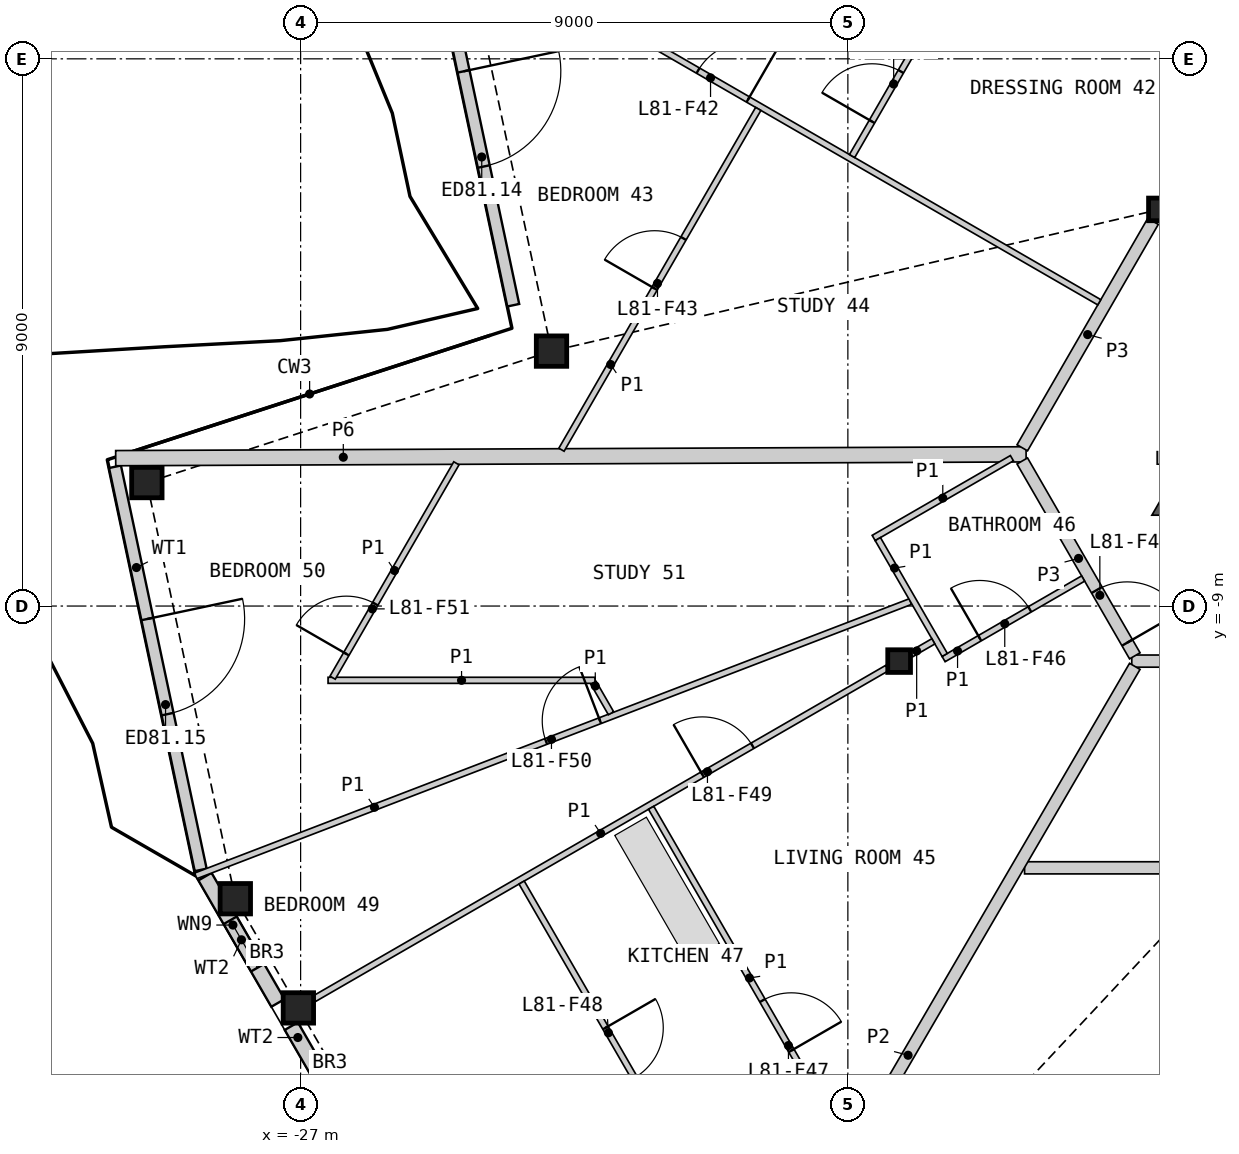
"""IFC4 building model, lengths in metres.
Left out: names, types, materials, properties, quantities, classifications, styles, units other than length and angle.
Written with IfcOpenShell. Run it as: python <this file> out.ifc"""

import sys

from ifc_helpers import new_model, si_unit, direction, frame, frame_2d, origin, origin_2d, place, context, subcontext, project, spatial, polyline, rectangle, hollow_rectangle, i_section, outline, extrude, element, fill, save


model = new_model("IFC4")
c1 = context("Model", 3, precision=1e-05, world=origin(), true_north=direction((0.0, 1.0)))
c2 = subcontext(c1, "Body", "Model", "MODEL_VIEW")
j1 = project(units=[si_unit("LENGTHUNIT", "METRE"), si_unit("PLANEANGLEUNIT", "RADIAN")], contexts=[c1])
p1 = place(None, origin())
s1 = spatial("IfcSite", under=j1, at=p1, CompositionType="ELEMENT")
p2 = place(p1, origin())
s2 = spatial("IfcBuilding", under=s1, at=p2, CompositionType="ELEMENT")
p3 = place(p2, frame((0.0, 0.0, 364.4)))
s3 = spatial("IfcBuildingStorey", under=s2, at=p3, CompositionType="ELEMENT", Elevation=364.4)
for number, where, z_axis, x_axis in (
    (1, (-22.874, -4.807, 0.0), (0.0, 0.0, 1.0), (1.0, 0.0, 0.0)),
    (2, (-29.529, -6.969, 0.0), (0.0, 0.0, 1.0), (1.0, 0.0, 0.0)),
    (3, (-28.074, -13.814, 0.0), (0.0, 0.0, 1.0), (1.0, 0.0, 0.0)),
    (4, (-27.037, -15.61, 0.0), (0.0, 0.0, 1.0), (1.0, 0.0, 0.0)),
):
    element("IfcColumn", number, at=place(p3, frame(where, z_axis=z_axis, x_axis=x_axis)), inside=s3, PredefinedType="COLUMN", context=c2, shape_type="SweptSolid", body=[
        extrude(hollow_rectangle(XDim=0.5, YDim=0.5, WallThickness=0.03, at=origin_2d()), origin(), (0.0, 0.0, 1.0), 3.4),
    ])
for number, where, z_axis, x_axis in (
    (5, (-12.868, -2.476, 0.0), (0.0, 0.0, 1.0), (1.0, 0.0, 0.0)),
    (6, (-17.157, -9.906, 0.0), (0.0, 0.0, 1.0), (1.0, 0.0, 0.0)),
):
    element("IfcColumn", number, at=place(p3, frame(where, z_axis=z_axis, x_axis=x_axis)), inside=s3, PredefinedType="COLUMN", context=c2, shape_type="SweptSolid", body=[
        extrude(i_section(OverallWidth=0.374, OverallDepth=0.372, WebThickness=0.016, FlangeThickness=0.026, at=origin_2d()), origin(), (0.0, 0.0, 1.0), 3.4),
    ])
p4 = place(p3, frame((-24.834, 2.209, 0.0), z_axis=(0.0, 0.0, 1.0), x_axis=(0.20791668045, -0.978146540142, 0.0)))
e7 = element("IfcWall", 7, at=p4, inside=s3, PredefinedType="SOLIDWALL", context=c2, shape_type="SweptSolid", body=[
    extrude(rectangle(XDim=6.402, YDim=0.2, at=frame_2d((3.201, 0.0))), origin(), (0.0, 0.0, 1.0), 2.634),
])
p5 = place(p4, frame((2.469, 0.0, 0.0)))
e8 = element("IfcOpeningElement", 8, at=p5, cuts=e7, PredefinedType="OPENING", context=c2, shape_type="SweptSolid", body=[
    extrude(rectangle(XDim=1.6, YDim=2.25, at=frame_2d((0.8, 1.125))), frame((0.0, 0.11, 0.0), z_axis=(0.0, -1.0, 0.0), x_axis=(1.0, 0.0, 0.0)), (0.0, 0.0, 1.0), 0.22),
])
p6 = place(p3, frame((-30.053, -6.709, 0.0), z_axis=(0.0, 0.0, 1.0), x_axis=(0.207917767315, -0.978146309115, 0.0)))
e9 = element("IfcWall", 9, at=p6, inside=s3, PredefinedType="SOLIDWALL", context=c2, shape_type="SweptSolid", body=[
    extrude(rectangle(XDim=6.779, YDim=0.2, at=frame_2d((3.389, 0.0))), origin(), (0.0, 0.0, 1.0), 2.634),
])
p7 = place(p6, frame((2.559, 0.0, 0.0)))
e10 = element("IfcOpeningElement", 10, at=p7, cuts=e9, PredefinedType="OPENING", context=c2, shape_type="SweptSolid", body=[
    extrude(rectangle(XDim=1.6, YDim=2.25, at=frame_2d((0.8, 1.125))), frame((0.0, 0.11, 0.0), z_axis=(0.0, -1.0, 0.0), x_axis=(1.0, 0.0, 0.0)), (0.0, 0.0, 1.0), 0.22),
])
p8 = place(p3, frame((-28.573, -13.45, 0.0), z_axis=(0.0, 0.0, 1.0), x_axis=(0.499969057507, -0.866043267704, 0.0)))
e11 = element("IfcWall", 11, at=p8, inside=s3, PredefinedType="SOLIDWALL", context=c2, shape_type="SweptSolid", body=[
    extrude(rectangle(XDim=2.4, YDim=0.25, at=frame_2d((1.2, 0.0))), origin(), (0.0, 0.0, 1.0), 2.634),
])
p9 = place(p8, frame((0.83, 0.0, 0.6)))
e12 = element("IfcOpeningElement", 12, at=p9, cuts=e11, PredefinedType="OPENING", context=c2, shape_type="SweptSolid", body=[
    extrude(rectangle(XDim=0.9, YDim=1.8, at=frame_2d((0.45, 0.9))), frame((0.0, 0.135, 0.0), z_axis=(0.0, -1.0, 0.0), x_axis=(1.0, 0.0, 0.0)), (0.0, 0.0, 1.0), 0.27),
])
p10 = place(p3, frame((-27.153, -15.91, 0.0), z_axis=(0.0, 0.0, 1.0), x_axis=(0.50000982419, -0.866019731711, 0.0)))
e13 = element("IfcWall", 13, at=p10, inside=s3, PredefinedType="SOLIDWALL", context=c2, shape_type="SweptSolid", body=[
    extrude(rectangle(XDim=2.157, YDim=0.25, at=frame_2d((1.079, 0.0))), origin(), (0.0, 0.0, 1.0), 2.634),
])
p11 = place(p3, origin())
e14 = element("IfcWall", 14, at=p11, inside=s3, PredefinedType="SHEAR", context=c2, shape_type="SweptSolid", body=[
    extrude(outline(polyline([(-12.48, -6.606), (-11.961, -6.906), (-11.961, -7.506), (-13.0, -7.506), (-12.48, -6.606)])), origin(), (0.0, 0.0, 1.0), 3.1),
])
p12 = place(p3, frame((-30.041, -6.568, 0.0), z_axis=(0.0, 0.0, 1.0), x_axis=(0.999991150877, 0.004206918925, 0.0)))
e15 = element("IfcWall", 15, at=p12, inside=s3, PredefinedType="PARTITIONING", context=c2, shape_type="SweptSolid", body=[
    extrude(rectangle(XDim=14.973, YDim=0.25, at=frame_2d((7.486, 0.0))), origin(), (0.0, 0.0, 1.0), 2.33),
])
p13 = place(p3, frame((-13.331, -9.906, 0.0), z_axis=(0.0, 0.0, 1.0), x_axis=(1.0, 0.0, 0.0)))
e16 = element("IfcWall", 16, at=p13, inside=s3, PredefinedType="PARTITIONING", context=c2, shape_type="SweptSolid", body=[
    extrude(rectangle(XDim=4.555, YDim=0.2, at=frame_2d((2.278, 0.0))), origin(), (0.0, 0.0, 1.0), 3.1),
])
p14 = place(p3, frame((-15.131, -6.397, 0.0), z_axis=(0.0, 0.0, 1.0), x_axis=(0.499986217557, 0.866033360935, 0.0)))
e17 = element("IfcWall", 17, at=p14, inside=s3, PredefinedType="PARTITIONING", context=c2, shape_type="SweptSolid", body=[
    extrude(rectangle(XDim=4.3, YDim=0.2, at=frame_2d((2.15, 0.0))), origin(), (0.0, 0.0, 1.0), 3.1),
])
p15 = place(p3, frame((-15.131, -6.614, 0.0), z_axis=(0.0, 0.0, 1.0), x_axis=(0.499948957823, -0.866054870994, 0.0)))
e18 = element("IfcWall", 18, at=p15, inside=s3, PredefinedType="PARTITIONING", context=c2, shape_type="SweptSolid", body=[
    extrude(rectangle(XDim=3.701, YDim=0.2, at=frame_2d((1.851, 0.0))), origin(), (0.0, 0.0, 1.0), 3.1),
])
p16 = place(p15, frame((2.451, 0.0, 0.0)))
e19 = element("IfcOpeningElement", 19, at=p16, cuts=e18, PredefinedType="OPENING", context=c2, shape_type="SweptSolid", body=[
    extrude(rectangle(XDim=1.0, YDim=2.1, at=frame_2d((0.5, 1.05))), frame((0.0, 0.11, 0.0), z_axis=(0.0, -1.0, 0.0), x_axis=(1.0, 0.0, 0.0)), (0.0, 0.0, 1.0), 0.22),
])
p17 = place(p3, frame((-15.094, -13.306, 0.0), z_axis=(0.0, 0.0, 1.0), x_axis=(1.0, 0.0, 0.0)))
e20 = element("IfcWall", 20, at=p17, inside=s3, PredefinedType="PARTITIONING", context=c2, shape_type="SweptSolid", body=[
    extrude(rectangle(XDim=14.994, YDim=0.2, at=frame_2d((7.497, 0.0))), origin(), (0.0, 0.0, 1.0), 2.33),
])
p18 = place(p17, frame((6.27, 0.0, 0.0)))
e21 = element("IfcOpeningElement", 21, at=p18, cuts=e20, PredefinedType="OPENING", context=c2, shape_type="SweptSolid", body=[
    extrude(rectangle(XDim=0.95, YDim=2.1, at=frame_2d((0.475, 1.05))), frame((0.0, 0.11, 0.0), z_axis=(0.0, -1.0, 0.0), x_axis=(1.0, 0.0, 0.0)), (0.0, 0.0, 1.0), 0.22),
])
p19 = place(p3, frame((-20.739, -22.784, 0.0), z_axis=(0.0, 0.0, 1.0), x_axis=(0.50362599185, 0.863921790635, 0.0)))
e22 = element("IfcWall", 22, at=p19, inside=s3, PredefinedType="PARTITIONING", context=c2, shape_type="SweptSolid", body=[
    extrude(rectangle(XDim=14.807, YDim=0.2, at=frame_2d((7.404, 0.0))), origin(), (0.0, 0.0, 1.0), 2.33),
])
p20 = place(p3, frame((-28.725, -13.438, 0.0), z_axis=(0.0, 0.0, 1.0), x_axis=(0.933580312145, 0.358368247444, 0.0)))
e23 = element("IfcWall", 23, at=p20, inside=s3, PredefinedType="PARTITIONING", context=c2, shape_type="SweptSolid", body=[
    extrude(rectangle(XDim=12.59, YDim=0.1, at=frame_2d((6.295, 0.0))), origin(), (0.0, 0.0, 1.0), 2.33),
])
p21 = place(p20, frame((6.171, 0.0, 0.0)))
e24 = element("IfcOpeningElement", 24, at=p21, cuts=e23, PredefinedType="OPENING", context=c2, shape_type="SweptSolid", body=[
    extrude(rectangle(XDim=0.95, YDim=2.1, at=frame_2d((0.475, 1.05))), frame((0.0, 0.06, 0.0), z_axis=(0.0, -1.0, 0.0), x_axis=(1.0, 0.0, 0.0)), (0.0, 0.0, 1.0), 0.12),
])
p22 = place(p3, frame((-24.069, 1.887, 0.0), z_axis=(0.0, 0.0, 1.0), x_axis=(0.866023404247, -0.500003463284, 0.0)))
e25 = element("IfcWall", 25, at=p22, inside=s3, PredefinedType="PARTITIONING", context=c2, shape_type="SweptSolid", body=[
    extrude(rectangle(XDim=11.782, YDim=0.1, at=frame_2d((5.891, 0.0))), origin(), (0.0, 0.0, 1.0), 2.33),
])
p23 = place(p22, frame((4.162, 0.0, 0.0)))
e26 = element("IfcOpeningElement", 26, at=p23, cuts=e25, PredefinedType="OPENING", context=c2, shape_type="SweptSolid", body=[
    extrude(rectangle(XDim=0.95, YDim=2.1, at=frame_2d((0.475, 1.05))), frame((0.0, 0.06, 0.0), z_axis=(0.0, -1.0, 0.0), x_axis=(1.0, 0.0, 0.0)), (0.0, 0.0, 1.0), 0.12),
])
p24 = place(p3, frame((-26.777, -15.46, 0.0), z_axis=(0.0, 0.0, 1.0), x_axis=(0.866019680922, 0.500009912158, 0.0)))
e27 = element("IfcWall", 27, at=p24, inside=s3, PredefinedType="PARTITIONING", context=c2, shape_type="SweptSolid", body=[
    extrude(rectangle(XDim=10.881, YDim=0.1, at=frame_2d((5.44, 0.0))), origin(), (0.0, 0.0, 1.0), 2.33),
])
p25 = place(p24, frame((7.373, 0.0, 0.0)))
e28 = element("IfcOpeningElement", 28, at=p25, cuts=e27, PredefinedType="OPENING", context=c2, shape_type="SweptSolid", body=[
    extrude(rectangle(XDim=0.95, YDim=2.1, at=frame_2d((0.475, 1.05))), frame((0.0, 0.06, 0.0), z_axis=(0.0, -1.0, 0.0), x_axis=(1.0, 0.0, 0.0)), (0.0, 0.0, 1.0), 0.12),
])
p26 = place(p3, frame((-23.365, -13.548, 0.0), z_axis=(0.0, 0.0, 1.0), x_axis=(0.500011483804, -0.866018773506, 0.0)))
e29 = element("IfcWall", 29, at=p26, inside=s3, PredefinedType="PARTITIONING", context=c2, shape_type="SweptSolid", body=[
    extrude(rectangle(XDim=7.872, YDim=0.1, at=frame_2d((3.936, 0.0))), origin(), (0.0, 0.0, 1.0), 2.33),
])
p27 = place(p26, frame((2.759, 0.0, 0.0)))
e30 = element("IfcOpeningElement", 30, at=p27, cuts=e29, PredefinedType="OPENING", context=c2, shape_type="SweptSolid", body=[
    extrude(rectangle(XDim=0.95, YDim=2.1, at=frame_2d((0.475, 1.05))), frame((0.0, 0.06, 0.0), z_axis=(0.0, -1.0, 0.0), x_axis=(1.0, 0.0, 0.0)), (0.0, 0.0, 1.0), 0.12),
])
p28 = place(p3, frame((-22.71, -6.429, 0.0), z_axis=(0.0, 0.0, 1.0), x_axis=(0.499984737558, 0.86603421538, 0.0)))
e31 = element("IfcWall", 31, at=p28, inside=s3, PredefinedType="PARTITIONING", context=c2, shape_type="SweptSolid", body=[
    extrude(rectangle(XDim=6.473, YDim=0.1, at=frame_2d((3.236, 0.0))), origin(), (0.0, 0.0, 1.0), 2.33),
])
p29 = place(p28, frame((3.063, 0.0, 0.0)))
e32 = element("IfcOpeningElement", 32, at=p29, cuts=e31, PredefinedType="OPENING", context=c2, shape_type="SweptSolid", body=[
    extrude(rectangle(XDim=0.95, YDim=2.1, at=frame_2d((0.475, 1.05))), frame((0.0, 0.06, 0.0), z_axis=(0.0, -1.0, 0.0), x_axis=(1.0, 0.0, 0.0)), (0.0, 0.0, 1.0), 0.12),
])
p30 = place(p3, frame((-21.235, -12.318, 0.0), z_axis=(0.0, 0.0, 1.0), x_axis=(0.500008973052, -0.866020223129, 0.0)))
e33 = element("IfcWall", 33, at=p30, inside=s3, PredefinedType="PARTITIONING", context=c2, shape_type="SweptSolid", body=[
    extrude(rectangle(XDim=6.466, YDim=0.1, at=frame_2d((3.233, 0.0))), origin(), (0.0, 0.0, 1.0), 2.33),
])
p31 = place(p30, frame((3.661, 0.0, 0.0)))
e34 = element("IfcOpeningElement", 34, at=p31, cuts=e33, PredefinedType="OPENING", context=c2, shape_type="SweptSolid", body=[
    extrude(rectangle(XDim=0.95, YDim=2.1, at=frame_2d((0.475, 1.05))), frame((0.0, 0.06, 0.0), z_axis=(0.0, -1.0, 0.0), x_axis=(1.0, 0.0, 0.0)), (0.0, 0.0, 1.0), 0.12),
])
p32 = place(p3, frame((-17.931, -1.599, 0.0), z_axis=(0.0, 0.0, 1.0), x_axis=(0.500005610874, 0.86602216432, 0.0)))
e35 = element("IfcWall", 35, at=p32, inside=s3, PredefinedType="PARTITIONING", context=c2, shape_type="SweptSolid", body=[
    extrude(rectangle(XDim=5.1, YDim=0.1, at=frame_2d((2.55, 0.0))), origin(), (0.0, 0.0, 1.0), 2.33),
])
p33 = place(p32, frame((0.656, 0.0, 0.0)))
e36 = element("IfcOpeningElement", 36, at=p33, cuts=e35, PredefinedType="OPENING", context=c2, shape_type="SweptSolid", body=[
    extrude(rectangle(XDim=0.95, YDim=2.1, at=frame_2d((0.475, 1.05))), frame((0.0, 0.06, 0.0), z_axis=(0.0, -1.0, 0.0), x_axis=(1.0, 0.0, 0.0)), (0.0, 0.0, 1.0), 0.12),
])
p34 = place(p3, frame((-26.549, -10.222, 0.0), z_axis=(0.0, 0.0, 1.0), x_axis=(1.0, 0.0, 0.0)))
e37 = element("IfcWall", 37, at=p34, inside=s3, PredefinedType="PARTITIONING", context=c2, shape_type="SweptSolid", body=[
    extrude(rectangle(XDim=4.391, YDim=0.1, at=frame_2d((2.195, 0.0))), origin(), (0.0, 0.0, 1.0), 2.33),
])
p35 = place(p3, frame((-26.474, -10.178, 0.0), z_axis=(0.0, 0.0, 1.0), x_axis=(0.499995835917, 0.866027807905, 0.0)))
e38 = element("IfcWall", 38, at=p35, inside=s3, PredefinedType="PARTITIONING", context=c2, shape_type="SweptSolid", body=[
    extrude(rectangle(XDim=4.071, YDim=0.1, at=frame_2d((2.036, 0.0))), origin(), (0.0, 0.0, 1.0), 2.33),
])
p36 = place(p35, frame((0.452, 0.0, 0.0)))
e39 = element("IfcOpeningElement", 39, at=p36, cuts=e38, PredefinedType="OPENING", context=c2, shape_type="SweptSolid", body=[
    extrude(rectangle(XDim=0.95, YDim=2.1, at=frame_2d((0.475, 1.05))), frame((0.0, 0.06, 0.0), z_axis=(0.0, -1.0, 0.0), x_axis=(1.0, 0.0, 0.0)), (0.0, 0.0, 1.0), 0.12),
])
p37 = place(p3, frame((-17.575, -7.881, 0.0), z_axis=(0.0, 0.0, 1.0), x_axis=(0.866013657776, 0.500020344131, 0.0)))
e40 = element("IfcWall", 40, at=p37, inside=s3, PredefinedType="PARTITIONING", context=c2, shape_type="SweptSolid", body=[
    extrude(rectangle(XDim=2.625, YDim=0.1, at=frame_2d((1.312, 0.0))), origin(), (0.0, 0.0, 1.0), 2.33),
])
p38 = place(p3, frame((-16.426, -9.872, 0.0), z_axis=(0.0, 0.0, 1.0), x_axis=(0.866029095148, 0.499993606316, 0.0)))
e41 = element("IfcWall", 41, at=p38, inside=s3, PredefinedType="PARTITIONING", context=c2, shape_type="SweptSolid", body=[
    extrude(rectangle(XDim=2.65, YDim=0.1, at=frame_2d((1.325, 0.0))), origin(), (0.0, 0.0, 1.0), 2.33),
])
p39 = place(p38, frame((0.686, 0.0, 0.0)))
e42 = element("IfcOpeningElement", 42, at=p39, cuts=e41, PredefinedType="OPENING", context=c2, shape_type="SweptSolid", body=[
    extrude(rectangle(XDim=0.95, YDim=2.1, at=frame_2d((0.475, 1.05))), frame((0.0, 0.06, 0.0), z_axis=(0.0, -1.0, 0.0), x_axis=(1.0, 0.0, 0.0)), (0.0, 0.0, 1.0), 0.12),
])
p40 = place(p3, frame((-17.507, -7.899, 0.0), z_axis=(0.0, 0.0, 1.0), x_axis=(0.499946605688, -0.86605622881, 0.0)))
e43 = element("IfcWall", 43, at=p40, inside=s3, PredefinedType="PARTITIONING", context=c2, shape_type="SweptSolid", body=[
    extrude(rectangle(XDim=2.2, YDim=0.1, at=frame_2d((1.1, 0.0))), origin(), (0.0, 0.0, 1.0), 2.33),
])
p41 = place(p3, frame((-22.183, -10.265, 0.0), z_axis=(0.0, 0.0, 1.0), x_axis=(0.500016142392, -0.86601608377, 0.0)))
e44 = element("IfcWall", 44, at=p41, inside=s3, PredefinedType="PARTITIONING", context=c2, shape_type="SweptSolid", body=[
    extrude(rectangle(XDim=0.576, YDim=0.1, at=frame_2d((0.288, 0.0))), origin(), (0.0, 0.0, 1.0), 2.33),
])
p42 = place(p3, frame((-16.96, -9.792, 0.0), z_axis=(0.0, 0.0, 1.0), x_axis=(0.866137484628, 0.499805820016, 0.0)))
e45 = element("IfcWall", 45, at=p42, inside=s3, PredefinedType="PARTITIONING", context=c2, shape_type="SweptSolid", body=[
    extrude(rectangle(XDim=0.423, YDim=0.1, at=frame_2d((0.211, 0.0))), origin(), (0.0, 0.0, 1.0), 2.33),
])
p43 = place(p5, origin())
e46 = element("IfcDoor", 46, at=p43, inside=s3, OperationType="DOUBLE_DOOR_SINGLE_SWING", PredefinedType="DOOR", context=c2, shape_type="SweptSolid", body=[
    extrude(rectangle(XDim=1.6, YDim=2.25, at=frame_2d((0.8, 1.125))), frame((0.0, 0.025, 0.0), z_axis=(0.0, -1.0, 0.0), x_axis=(1.0, 0.0, 0.0)), (0.0, 0.0, 1.0), 0.05),
])
fill(e8, e46)
p44 = place(p7, origin())
e47 = element("IfcDoor", 47, at=p44, inside=s3, OperationType="DOUBLE_DOOR_SINGLE_SWING", PredefinedType="DOOR", context=c2, shape_type="SweptSolid", body=[
    extrude(rectangle(XDim=1.6, YDim=2.25, at=frame_2d((0.8, 1.125))), frame((0.0, 0.025, 0.0), z_axis=(0.0, -1.0, 0.0), x_axis=(1.0, 0.0, 0.0)), (0.0, 0.0, 1.0), 0.05),
])
fill(e10, e47)
p45 = place(p9, origin())
e48 = element("IfcWindow", 48, at=p45, inside=s3, PartitioningType="SINGLE_PANEL", PredefinedType="WINDOW", context=c2, shape_type="SweptSolid", body=[
    extrude(rectangle(XDim=0.9, YDim=1.8, at=frame_2d((0.45, 0.9))), frame((0.0, 0.03, 0.0), z_axis=(0.0, -1.0, 0.0), x_axis=(1.0, 0.0, 0.0)), (0.0, 0.0, 1.0), 0.06),
])
fill(e12, e48)
p46 = place(p33, origin())
e49 = element("IfcDoor", 49, at=p46, inside=s3, OperationType="SINGLE_SWING_LEFT", PredefinedType="DOOR", context=c2, shape_type="SweptSolid", body=[
    extrude(rectangle(XDim=0.95, YDim=2.1, at=frame_2d((0.475, 1.05))), frame((0.0, 0.025, 0.0), z_axis=(0.0, -1.0, 0.0), x_axis=(1.0, 0.0, 0.0)), (0.0, 0.0, 1.0), 0.05),
])
fill(e36, e49)
p47 = place(p23, origin())
e50 = element("IfcDoor", 50, at=p47, inside=s3, OperationType="SINGLE_SWING_RIGHT", PredefinedType="DOOR", context=c2, shape_type="SweptSolid", body=[
    extrude(rectangle(XDim=0.95, YDim=2.1, at=frame_2d((0.475, 1.05))), frame((0.0, 0.025, 0.0), z_axis=(0.0, -1.0, 0.0), x_axis=(1.0, 0.0, 0.0)), (0.0, 0.0, 1.0), 0.05),
])
fill(e26, e50)
p48 = place(p29, origin())
e51 = element("IfcDoor", 51, at=p48, inside=s3, OperationType="SINGLE_SWING_LEFT", PredefinedType="DOOR", context=c2, shape_type="SweptSolid", body=[
    extrude(rectangle(XDim=0.95, YDim=2.1, at=frame_2d((0.475, 1.05))), frame((0.0, 0.025, 0.0), z_axis=(0.0, -1.0, 0.0), x_axis=(1.0, 0.0, 0.0)), (0.0, 0.0, 1.0), 0.05),
])
fill(e32, e51)
p49 = place(p16, origin())
e52 = element("IfcDoor", 52, at=p49, inside=s3, OperationType="SINGLE_SWING_RIGHT", PredefinedType="DOOR", context=c2, shape_type="SweptSolid", body=[
    extrude(rectangle(XDim=1.0, YDim=2.1, at=frame_2d((0.5, 1.05))), frame((0.0, 0.025, 0.0), z_axis=(0.0, -1.0, 0.0), x_axis=(1.0, 0.0, 0.0)), (0.0, 0.0, 1.0), 0.05),
])
fill(e19, e52)
p50 = place(p39, origin())
e53 = element("IfcDoor", 53, at=p50, inside=s3, OperationType="SINGLE_SWING_LEFT", PredefinedType="DOOR", context=c2, shape_type="SweptSolid", body=[
    extrude(rectangle(XDim=0.95, YDim=2.1, at=frame_2d((0.475, 1.05))), frame((0.0, 0.025, 0.0), z_axis=(0.0, -1.0, 0.0), x_axis=(1.0, 0.0, 0.0)), (0.0, 0.0, 1.0), 0.05),
])
fill(e42, e53)
p51 = place(p31, origin())
e54 = element("IfcDoor", 54, at=p51, inside=s3, OperationType="SINGLE_SWING_RIGHT", PredefinedType="DOOR", context=c2, shape_type="SweptSolid", body=[
    extrude(rectangle(XDim=0.95, YDim=2.1, at=frame_2d((0.475, 1.05))), frame((0.0, 0.025, 0.0), z_axis=(0.0, -1.0, 0.0), x_axis=(1.0, 0.0, 0.0)), (0.0, 0.0, 1.0), 0.05),
])
fill(e34, e54)
p52 = place(p27, origin())
e55 = element("IfcDoor", 55, at=p52, inside=s3, OperationType="SINGLE_SWING_LEFT", PredefinedType="DOOR", context=c2, shape_type="SweptSolid", body=[
    extrude(rectangle(XDim=0.95, YDim=2.1, at=frame_2d((0.475, 1.05))), frame((0.0, 0.025, 0.0), z_axis=(0.0, -1.0, 0.0), x_axis=(1.0, 0.0, 0.0)), (0.0, 0.0, 1.0), 0.05),
])
fill(e30, e55)
p53 = place(p25, origin())
e56 = element("IfcDoor", 56, at=p53, inside=s3, OperationType="SINGLE_SWING_LEFT", PredefinedType="DOOR", context=c2, shape_type="SweptSolid", body=[
    extrude(rectangle(XDim=0.95, YDim=2.1, at=frame_2d((0.475, 1.05))), frame((0.0, 0.025, 0.0), z_axis=(0.0, -1.0, 0.0), x_axis=(1.0, 0.0, 0.0)), (0.0, 0.0, 1.0), 0.05),
])
fill(e28, e56)
p54 = place(p21, origin())
e57 = element("IfcDoor", 57, at=p54, inside=s3, OperationType="SINGLE_SWING_RIGHT", PredefinedType="DOOR", context=c2, shape_type="SweptSolid", body=[
    extrude(rectangle(XDim=0.95, YDim=2.1, at=frame_2d((0.475, 1.05))), frame((0.0, 0.025, 0.0), z_axis=(0.0, -1.0, 0.0), x_axis=(1.0, 0.0, 0.0)), (0.0, 0.0, 1.0), 0.05),
])
fill(e24, e57)
p55 = place(p36, origin())
e58 = element("IfcDoor", 58, at=p55, inside=s3, OperationType="SINGLE_SWING_LEFT", PredefinedType="DOOR", context=c2, shape_type="SweptSolid", body=[
    extrude(rectangle(XDim=0.95, YDim=2.1, at=frame_2d((0.475, 1.05))), frame((0.0, 0.025, 0.0), z_axis=(0.0, -1.0, 0.0), x_axis=(1.0, 0.0, 0.0)), (0.0, 0.0, 1.0), 0.05),
])
fill(e39, e58)
save(model, sys.argv[1])
